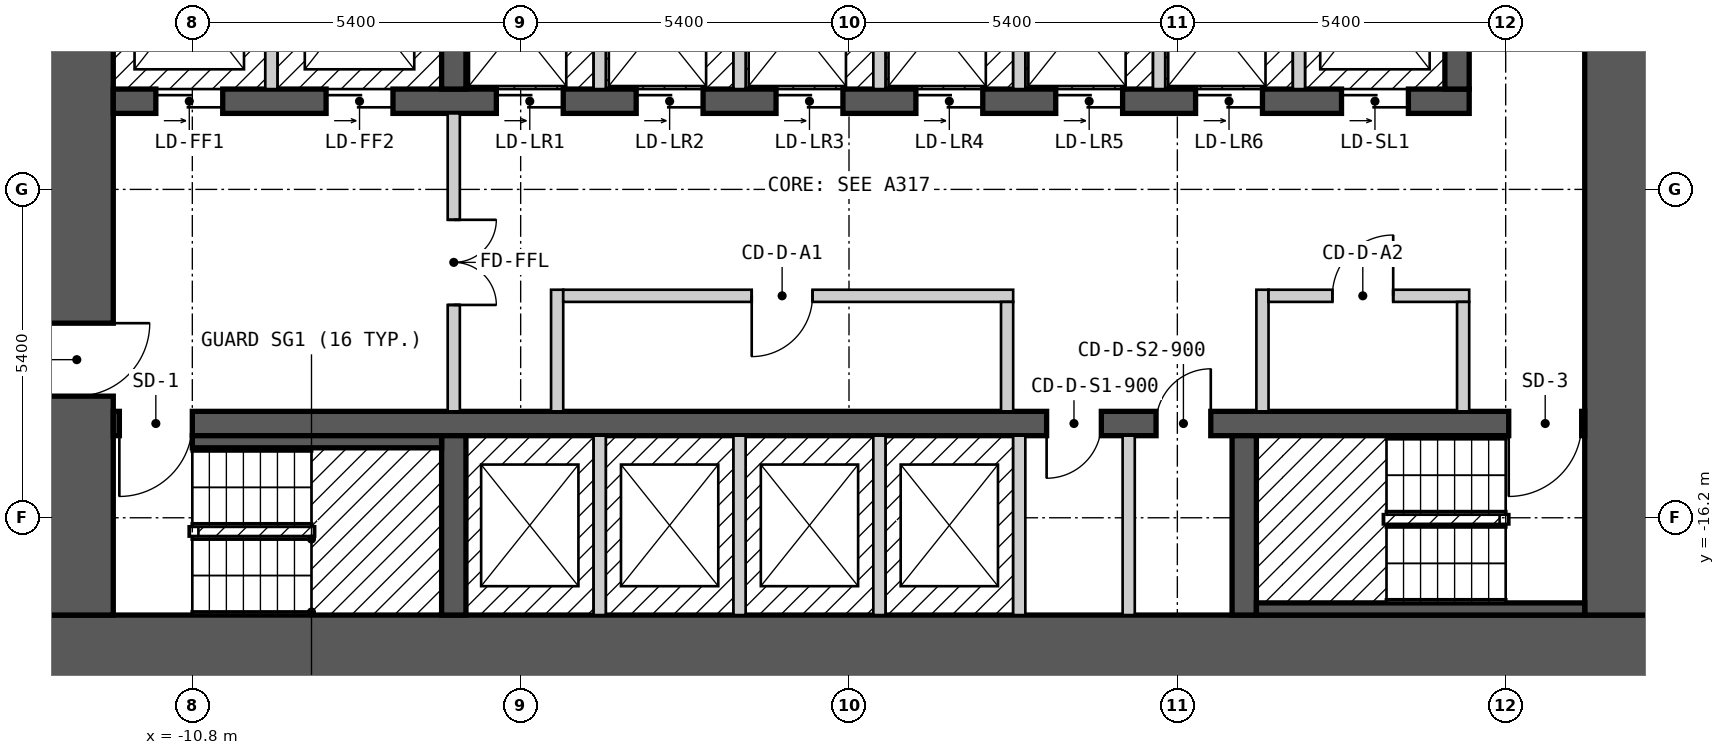
"""IFC4 building model, lengths in metres.
Left out: names, types, materials, properties, quantities, classifications, styles, units other than length and angle.
Written with IfcOpenShell. Run it as: python <this file> out.ifc"""

import sys

from ifc_helpers import new_model, si_unit, direction, frame, frame_2d, origin, place, context, subcontext, project, spatial, rectangle, extrude, element, fill, save


model = new_model("IFC4")
c1 = context("Model", 3, precision=1e-05, world=origin(), true_north=direction((0.0, 1.0)))
c2 = subcontext(c1, "Body", "Model", "MODEL_VIEW")
j1 = project(units=[si_unit("LENGTHUNIT", "METRE"), si_unit("PLANEANGLEUNIT", "RADIAN")], contexts=[c1])
p1 = place(None, origin())
s1 = spatial("IfcSite", under=j1, at=p1, CompositionType="ELEMENT")
p2 = place(p1, origin())
s2 = spatial("IfcBuilding", under=s1, at=p2, CompositionType="ELEMENT")
p3 = place(p2, frame((0.0, 0.0, 50.4)))
s3 = spatial("IfcBuildingStorey", under=s2, at=p3, CompositionType="ELEMENT", Elevation=50.4)
p4 = place(p3, frame((-13.3, -18.4, 0.0), z_axis=(0.0, 0.0, 1.0), x_axis=(1.0, 0.0, 0.0)))
e1 = element("IfcWall", 1, at=p4, inside=s3, PredefinedType="SHEAR", context=c2, shape_type="SweptSolid", body=[
    extrude(rectangle(XDim=26.6, YDim=1.2, at=frame_2d((13.3, 0.0))), origin(), (0.0, 0.0, 1.0), 2.7),
])
p5 = place(p3, frame((-12.7, -17.8, 0.0), z_axis=(0.0, 0.0, 1.0), x_axis=(0.0, 1.0, 0.0)))
e2 = element("IfcWall", 2, at=p5, inside=s3, PredefinedType="SHEAR", context=c2, shape_type="SweptSolid", body=[
    extrude(rectangle(XDim=11.6, YDim=1.2, at=frame_2d((5.8, 0.0))), origin(), (0.0, 0.0, 1.0), 2.7),
])
p6 = place(p5, frame((3.6, 0.0, 0.0)))
e3 = element("IfcOpeningElement", 3, at=p6, cuts=e2, PredefinedType="OPENING", context=c2, shape_type="SweptSolid", body=[
    extrude(rectangle(XDim=1.2, YDim=2.1, at=frame_2d((0.6, 1.05))), frame((0.0, 0.61, 0.0), z_axis=(0.0, -1.0, 0.0), x_axis=(1.0, 0.0, 0.0)), (0.0, 0.0, 1.0), 1.22),
])
p7 = place(p3, frame((12.7, -17.8, 0.0), z_axis=(0.0, 0.0, 1.0), x_axis=(0.0, 1.0, 0.0)))
e4 = element("IfcWall", 4, at=p7, inside=s3, PredefinedType="SHEAR", context=c2, shape_type="SweptSolid", body=[
    extrude(rectangle(XDim=11.6, YDim=1.2, at=frame_2d((5.8, 0.0))), origin(), (0.0, 0.0, 1.0), 2.7),
])
p8 = place(p3, frame((-12.1, -14.65, 0.0), z_axis=(0.0, 0.0, 1.0), x_axis=(1.0, 0.0, 0.0)))
e5 = element("IfcWall", 5, at=p8, inside=s3, PredefinedType="SHEAR", context=c2, shape_type="SweptSolid", body=[
    extrude(rectangle(XDim=24.2, YDim=0.4, at=frame_2d((12.1, 0.0))), origin(), (0.0, 0.0, 1.0), 2.7),
])
p9 = place(p8, frame((1.3, 0.0, 0.0), z_axis=(0.0, 0.0, 1.0), x_axis=(-1.0, 0.0, 0.0)))
e6 = element("IfcOpeningElement", 6, at=p9, cuts=e5, PredefinedType="OPENING", context=c2, shape_type="SweptSolid", body=[
    extrude(rectangle(XDim=1.2, YDim=2.1, at=frame_2d((0.6, 1.05))), frame((0.0, 0.21, 0.0), z_axis=(0.0, -1.0, 0.0), x_axis=(1.0, 0.0, 0.0)), (0.0, 0.0, 1.0), 0.42),
])
p10 = place(p8, frame((24.15, 0.0, 0.0), z_axis=(0.0, 0.0, 1.0), x_axis=(-1.0, 0.0, 0.0)))
e7 = element("IfcOpeningElement", 7, at=p10, cuts=e5, PredefinedType="OPENING", context=c2, shape_type="SweptSolid", body=[
    extrude(rectangle(XDim=1.2, YDim=2.1, at=frame_2d((0.6, 1.05))), frame((0.0, 0.21, 0.0), z_axis=(0.0, -1.0, 0.0), x_axis=(1.0, 0.0, 0.0)), (0.0, 0.0, 1.0), 0.42),
])
p11 = place(p8, frame((16.25, 0.0, 0.0), z_axis=(0.0, 0.0, 1.0), x_axis=(-1.0, 0.0, 0.0)))
e8 = element("IfcOpeningElement", 8, at=p11, cuts=e5, PredefinedType="OPENING", context=c2, shape_type="SweptSolid", body=[
    extrude(rectangle(XDim=0.9, YDim=2.1, at=frame_2d((0.45, 1.05))), frame((0.0, 0.21, 0.0), z_axis=(0.0, -1.0, 0.0), x_axis=(1.0, 0.0, 0.0)), (0.0, 0.0, 1.0), 0.42),
])
p12 = place(p8, frame((18.05, 0.0, 0.0), z_axis=(0.0, 0.0, 1.0), x_axis=(-1.0, 0.0, 0.0)))
e9 = element("IfcOpeningElement", 9, at=p12, cuts=e5, PredefinedType="OPENING", context=c2, shape_type="SweptSolid", body=[
    extrude(rectangle(XDim=0.9, YDim=2.1, at=frame_2d((0.45, 1.05))), frame((0.0, 0.21, 0.0), z_axis=(0.0, -1.0, 0.0), x_axis=(1.0, 0.0, 0.0)), (0.0, 0.0, 1.0), 0.42),
])
p13 = place(p3, frame((-12.1, -9.35, 0.0), z_axis=(0.0, 0.0, 1.0), x_axis=(1.0, 0.0, 0.0)))
e10 = element("IfcWall", 10, at=p13, inside=s3, PredefinedType="SHEAR", context=c2, shape_type="SweptSolid", body=[
    extrude(rectangle(XDim=22.3, YDim=0.4, at=frame_2d((11.15, 0.0))), origin(), (0.0, 0.0, 1.0), 2.7),
])
p14 = place(p13, frame((0.7, 0.0, 0.0)))
e11 = element("IfcOpeningElement", 11, at=p14, cuts=e10, PredefinedType="OPENING", context=c2, shape_type="SweptSolid", body=[
    extrude(rectangle(XDim=1.1, YDim=2.1, at=frame_2d((0.55, 1.05))), frame((0.0, 0.21, 0.0), z_axis=(0.0, -1.0, 0.0), x_axis=(1.0, 0.0, 0.0)), (0.0, 0.0, 1.0), 0.42),
])
p15 = place(p13, frame((3.5, 0.0, 0.0)))
e12 = element("IfcOpeningElement", 12, at=p15, cuts=e10, PredefinedType="OPENING", context=c2, shape_type="SweptSolid", body=[
    extrude(rectangle(XDim=1.1, YDim=2.1, at=frame_2d((0.55, 1.05))), frame((0.0, 0.21, 0.0), z_axis=(0.0, -1.0, 0.0), x_axis=(1.0, 0.0, 0.0)), (0.0, 0.0, 1.0), 0.42),
])
p16 = place(p13, frame((6.3, 0.0, 0.0)))
e13 = element("IfcOpeningElement", 13, at=p16, cuts=e10, PredefinedType="OPENING", context=c2, shape_type="SweptSolid", body=[
    extrude(rectangle(XDim=1.1, YDim=2.1, at=frame_2d((0.55, 1.05))), frame((0.0, 0.21, 0.0), z_axis=(0.0, -1.0, 0.0), x_axis=(1.0, 0.0, 0.0)), (0.0, 0.0, 1.0), 0.42),
])
p17 = place(p13, frame((8.6, 0.0, 0.0)))
e14 = element("IfcOpeningElement", 14, at=p17, cuts=e10, PredefinedType="OPENING", context=c2, shape_type="SweptSolid", body=[
    extrude(rectangle(XDim=1.1, YDim=2.1, at=frame_2d((0.55, 1.05))), frame((0.0, 0.21, 0.0), z_axis=(0.0, -1.0, 0.0), x_axis=(1.0, 0.0, 0.0)), (0.0, 0.0, 1.0), 0.42),
])
p18 = place(p13, frame((10.9, 0.0, 0.0)))
e15 = element("IfcOpeningElement", 15, at=p18, cuts=e10, PredefinedType="OPENING", context=c2, shape_type="SweptSolid", body=[
    extrude(rectangle(XDim=1.1, YDim=2.1, at=frame_2d((0.55, 1.05))), frame((0.0, 0.21, 0.0), z_axis=(0.0, -1.0, 0.0), x_axis=(1.0, 0.0, 0.0)), (0.0, 0.0, 1.0), 0.42),
])
p19 = place(p13, frame((13.2, 0.0, 0.0)))
e16 = element("IfcOpeningElement", 16, at=p19, cuts=e10, PredefinedType="OPENING", context=c2, shape_type="SweptSolid", body=[
    extrude(rectangle(XDim=1.1, YDim=2.1, at=frame_2d((0.55, 1.05))), frame((0.0, 0.21, 0.0), z_axis=(0.0, -1.0, 0.0), x_axis=(1.0, 0.0, 0.0)), (0.0, 0.0, 1.0), 0.42),
])
p20 = place(p13, frame((15.5, 0.0, 0.0)))
e17 = element("IfcOpeningElement", 17, at=p20, cuts=e10, PredefinedType="OPENING", context=c2, shape_type="SweptSolid", body=[
    extrude(rectangle(XDim=1.1, YDim=2.1, at=frame_2d((0.55, 1.05))), frame((0.0, 0.21, 0.0), z_axis=(0.0, -1.0, 0.0), x_axis=(1.0, 0.0, 0.0)), (0.0, 0.0, 1.0), 0.42),
])
p21 = place(p13, frame((17.8, 0.0, 0.0)))
e18 = element("IfcOpeningElement", 18, at=p21, cuts=e10, PredefinedType="OPENING", context=c2, shape_type="SweptSolid", body=[
    extrude(rectangle(XDim=1.1, YDim=2.1, at=frame_2d((0.55, 1.05))), frame((0.0, 0.21, 0.0), z_axis=(0.0, -1.0, 0.0), x_axis=(1.0, 0.0, 0.0)), (0.0, 0.0, 1.0), 0.42),
])
p22 = place(p13, frame((20.2, 0.0, 0.0)))
e19 = element("IfcOpeningElement", 19, at=p22, cuts=e10, PredefinedType="OPENING", context=c2, shape_type="SweptSolid", body=[
    extrude(rectangle(XDim=1.1, YDim=2.1, at=frame_2d((0.55, 1.05))), frame((0.0, 0.21, 0.0), z_axis=(0.0, -1.0, 0.0), x_axis=(1.0, 0.0, 0.0)), (0.0, 0.0, 1.0), 0.42),
])
for number, where, z_axis, x_axis in (
    (20, (-6.5, -17.8, 0.0), (0.0, 0.0, 1.0), (0.0, 1.0, 0.0)),
    (21, (6.5, -17.8, 0.0), (0.0, 0.0, 1.0), (0.0, 1.0, 0.0)),
    (22, (-6.5, -9.15, 0.0), (0.0, 0.0, 1.0), (0.0, 1.0, 0.0)),
    (23, (10.0, -9.15, 0.0), (0.0, 0.0, 1.0), (0.0, 1.0, 0.0)),
):
    element("IfcWall", number, at=place(p3, frame(where, z_axis=z_axis, x_axis=x_axis)), inside=s3, PredefinedType="SHEAR", context=c2, shape_type="SweptSolid", body=[
        extrude(rectangle(XDim=2.95, YDim=0.4, at=frame_2d((1.475, 0.0))), origin(), (0.0, 0.0, 1.0), 2.7),
    ])
p23 = place(p3, frame((-10.8, -14.95, 0.0), z_axis=(0.0, 0.0, 1.0), x_axis=(1.0, 0.0, 0.0)))
e24 = element("IfcWall", 24, at=p23, inside=s3, PredefinedType="SOLIDWALL", context=c2, shape_type="SweptSolid", body=[
    extrude(rectangle(XDim=4.1, YDim=0.2, at=frame_2d((2.05, 0.0))), origin(), (0.0, 0.0, 1.0), 2.7),
])
p24 = place(p3, frame((-9.5, -9.15, 0.0), z_axis=(0.0, 0.0, 1.0), x_axis=(0.0, 1.0, 0.0)))
e25 = element("IfcWall", 25, at=p24, inside=s3, PredefinedType="SOLIDWALL", context=c2, shape_type="SweptSolid", body=[
    extrude(rectangle(XDim=2.95, YDim=0.2, at=frame_2d((1.475, 0.0))), origin(), (0.0, 0.0, 1.0), 2.7),
])
p25 = place(p3, frame((-6.5, -14.45, 0.0), z_axis=(0.0, 0.0, 1.0), x_axis=(0.0, 1.0, 0.0)))
e26 = element("IfcWall", 26, at=p25, inside=s3, PredefinedType="PARTITIONING", context=c2, shape_type="SweptSolid", body=[
    extrude(rectangle(XDim=4.9, YDim=0.2, at=frame_2d((2.45, 0.0))), origin(), (0.0, 0.0, 1.0), 2.7),
])
p26 = place(p25, frame((3.15, 0.0, 0.0), z_axis=(0.0, 0.0, 1.0), x_axis=(-1.0, 0.0, 0.0)))
e27 = element("IfcOpeningElement", 27, at=p26, cuts=e26, PredefinedType="OPENING", context=c2, shape_type="SweptSolid", body=[
    extrude(rectangle(XDim=1.4, YDim=2.1, at=frame_2d((0.7, 1.05))), frame((0.0, 0.11, 0.0), z_axis=(0.0, -1.0, 0.0), x_axis=(1.0, 0.0, 0.0)), (0.0, 0.0, 1.0), 0.22),
])
p27 = place(p3, frame((-4.8, -14.45, 0.0), z_axis=(0.0, 0.0, 1.0), x_axis=(0.0, 1.0, 0.0)))
e28 = element("IfcWall", 28, at=p27, inside=s3, PredefinedType="PARTITIONING", context=c2, shape_type="SweptSolid", body=[
    extrude(rectangle(XDim=2.0, YDim=0.2, at=frame_2d((1.0, 0.0))), origin(), (0.0, 0.0, 1.0), 2.7),
])
p28 = place(p3, frame((-4.7, -12.55, 0.0), z_axis=(0.0, 0.0, 1.0), x_axis=(1.0, 0.0, 0.0)))
e29 = element("IfcWall", 29, at=p28, inside=s3, PredefinedType="PARTITIONING", context=c2, shape_type="SweptSolid", body=[
    extrude(rectangle(XDim=7.4, YDim=0.2, at=frame_2d((3.7, 0.0))), origin(), (0.0, 0.0, 1.0), 2.7),
])
p29 = place(p28, frame((4.1, 0.0, 0.0), z_axis=(0.0, 0.0, 1.0), x_axis=(-1.0, 0.0, 0.0)))
e30 = element("IfcOpeningElement", 30, at=p29, cuts=e29, PredefinedType="OPENING", context=c2, shape_type="SweptSolid", body=[
    extrude(rectangle(XDim=1.0, YDim=2.1, at=frame_2d((0.5, 1.05))), frame((0.0, 0.11, 0.0), z_axis=(0.0, -1.0, 0.0), x_axis=(1.0, 0.0, 0.0)), (0.0, 0.0, 1.0), 0.22),
])
for number, where, z_axis, x_axis in (
    (31, (-4.1, -17.8, 0.0), (0.0, 0.0, 1.0), (0.0, 1.0, 0.0)),
    (32, (-4.1, -9.15, 0.0), (0.0, 0.0, 1.0), (0.0, 1.0, 0.0)),
    (33, (-1.8, -17.8, 0.0), (0.0, 0.0, 1.0), (0.0, 1.0, 0.0)),
    (34, (-1.8, -9.15, 0.0), (0.0, 0.0, 1.0), (0.0, 1.0, 0.0)),
    (35, (0.5, -17.8, 0.0), (0.0, 0.0, 1.0), (0.0, 1.0, 0.0)),
    (36, (0.5, -9.15, 0.0), (0.0, 0.0, 1.0), (0.0, 1.0, 0.0)),
):
    element("IfcWall", number, at=place(p3, frame(where, z_axis=z_axis, x_axis=x_axis)), inside=s3, PredefinedType="SOLIDWALL", context=c2, shape_type="SweptSolid", body=[
        extrude(rectangle(XDim=2.95, YDim=0.2, at=frame_2d((1.475, 0.0))), origin(), (0.0, 0.0, 1.0), 2.7),
    ])
p30 = place(p3, frame((2.6, -14.45, 0.0), z_axis=(0.0, 0.0, 1.0), x_axis=(0.0, 1.0, 0.0)))
e37 = element("IfcWall", 37, at=p30, inside=s3, PredefinedType="PARTITIONING", context=c2, shape_type="SweptSolid", body=[
    extrude(rectangle(XDim=1.8, YDim=0.2, at=frame_2d((0.9, 0.0))), origin(), (0.0, 0.0, 1.0), 2.7),
])
for number, where, z_axis, x_axis in (
    (38, (2.8, -17.8, 0.0), (0.0, 0.0, 1.0), (0.0, 1.0, 0.0)),
    (39, (2.8, -9.15, 0.0), (0.0, 0.0, 1.0), (0.0, 1.0, 0.0)),
):
    element("IfcWall", number, at=place(p3, frame(where, z_axis=z_axis, x_axis=x_axis)), inside=s3, PredefinedType="SOLIDWALL", context=c2, shape_type="SweptSolid", body=[
        extrude(rectangle(XDim=2.95, YDim=0.2, at=frame_2d((1.475, 0.0))), origin(), (0.0, 0.0, 1.0), 2.7),
    ])
p31 = place(p3, frame((4.6, -17.8, 0.0), z_axis=(0.0, 0.0, 1.0), x_axis=(0.0, 1.0, 0.0)))
e40 = element("IfcWall", 40, at=p31, inside=s3, PredefinedType="PARTITIONING", context=c2, shape_type="SweptSolid", body=[
    extrude(rectangle(XDim=2.95, YDim=0.2, at=frame_2d((1.475, 0.0))), origin(), (0.0, 0.0, 1.0), 2.7),
])
p32 = place(p3, frame((5.1, -9.15, 0.0), z_axis=(0.0, 0.0, 1.0), x_axis=(0.0, 1.0, 0.0)))
e41 = element("IfcWall", 41, at=p32, inside=s3, PredefinedType="SOLIDWALL", context=c2, shape_type="SweptSolid", body=[
    extrude(rectangle(XDim=2.95, YDim=0.2, at=frame_2d((1.475, 0.0))), origin(), (0.0, 0.0, 1.0), 2.7),
])
p33 = place(p3, frame((6.7, -17.7, 0.0), z_axis=(0.0, 0.0, 1.0), x_axis=(1.0, 0.0, 0.0)))
e42 = element("IfcWall", 42, at=p33, inside=s3, PredefinedType="SOLIDWALL", context=c2, shape_type="SweptSolid", body=[
    extrude(rectangle(XDim=5.4, YDim=0.2, at=frame_2d((2.7, 0.0))), origin(), (0.0, 0.0, 1.0), 2.7),
])
p34 = place(p3, frame((6.8, -14.45, 0.0), z_axis=(0.0, 0.0, 1.0), x_axis=(0.0, 1.0, 0.0)))
e43 = element("IfcWall", 43, at=p34, inside=s3, PredefinedType="PARTITIONING", context=c2, shape_type="SweptSolid", body=[
    extrude(rectangle(XDim=2.0, YDim=0.2, at=frame_2d((1.0, 0.0))), origin(), (0.0, 0.0, 1.0), 2.7),
])
p35 = place(p3, frame((6.9, -12.55, 0.0), z_axis=(0.0, 0.0, 1.0), x_axis=(1.0, 0.0, 0.0)))
e44 = element("IfcWall", 44, at=p35, inside=s3, PredefinedType="PARTITIONING", context=c2, shape_type="SweptSolid", body=[
    extrude(rectangle(XDim=3.3, YDim=0.2, at=frame_2d((1.65, 0.0))), origin(), (0.0, 0.0, 1.0), 2.7),
])
p36 = place(p35, frame((2.05, 0.0, 0.0), z_axis=(0.0, 0.0, 1.0), x_axis=(-1.0, 0.0, 0.0)))
e45 = element("IfcOpeningElement", 45, at=p36, cuts=e44, PredefinedType="OPENING", context=c2, shape_type="SweptSolid", body=[
    extrude(rectangle(XDim=1.0, YDim=2.1, at=frame_2d((0.5, 1.05))), frame((0.0, 0.11, 0.0), z_axis=(0.0, -1.0, 0.0), x_axis=(1.0, 0.0, 0.0)), (0.0, 0.0, 1.0), 0.22),
])
p37 = place(p3, frame((7.4, -9.15, 0.0), z_axis=(0.0, 0.0, 1.0), x_axis=(0.0, 1.0, 0.0)))
e46 = element("IfcWall", 46, at=p37, inside=s3, PredefinedType="SOLIDWALL", context=c2, shape_type="SweptSolid", body=[
    extrude(rectangle(XDim=2.95, YDim=0.2, at=frame_2d((1.475, 0.0))), origin(), (0.0, 0.0, 1.0), 2.7),
])
p38 = place(p3, frame((10.1, -14.45, 0.0), z_axis=(0.0, 0.0, 1.0), x_axis=(0.0, 1.0, 0.0)))
e47 = element("IfcWall", 47, at=p38, inside=s3, PredefinedType="PARTITIONING", context=c2, shape_type="SweptSolid", body=[
    extrude(rectangle(XDim=1.8, YDim=0.2, at=frame_2d((0.9, 0.0))), origin(), (0.0, 0.0, 1.0), 2.7),
])
p39 = place(p14, origin())
e48 = element("IfcDoor", 48, at=p39, inside=s3, OperationType="DOUBLE_DOOR_SLIDING", PredefinedType="DOOR", context=c2, shape_type="SweptSolid", body=[
    extrude(rectangle(XDim=1.1, YDim=2.1, at=frame_2d((0.55, 1.05))), frame((0.0, 0.025, 0.0), z_axis=(0.0, -1.0, 0.0), x_axis=(1.0, 0.0, 0.0)), (0.0, 0.0, 1.0), 0.05),
])
fill(e11, e48)
p40 = place(p15, origin())
e49 = element("IfcDoor", 49, at=p40, inside=s3, OperationType="DOUBLE_DOOR_SLIDING", PredefinedType="DOOR", context=c2, shape_type="SweptSolid", body=[
    extrude(rectangle(XDim=1.1, YDim=2.1, at=frame_2d((0.55, 1.05))), frame((0.0, 0.025, 0.0), z_axis=(0.0, -1.0, 0.0), x_axis=(1.0, 0.0, 0.0)), (0.0, 0.0, 1.0), 0.05),
])
fill(e12, e49)
p41 = place(p16, origin())
e50 = element("IfcDoor", 50, at=p41, inside=s3, OperationType="DOUBLE_DOOR_SLIDING", PredefinedType="DOOR", context=c2, shape_type="SweptSolid", body=[
    extrude(rectangle(XDim=1.1, YDim=2.1, at=frame_2d((0.55, 1.05))), frame((0.0, 0.025, 0.0), z_axis=(0.0, -1.0, 0.0), x_axis=(1.0, 0.0, 0.0)), (0.0, 0.0, 1.0), 0.05),
])
fill(e13, e50)
p42 = place(p17, origin())
e51 = element("IfcDoor", 51, at=p42, inside=s3, OperationType="DOUBLE_DOOR_SLIDING", PredefinedType="DOOR", context=c2, shape_type="SweptSolid", body=[
    extrude(rectangle(XDim=1.1, YDim=2.1, at=frame_2d((0.55, 1.05))), frame((0.0, 0.025, 0.0), z_axis=(0.0, -1.0, 0.0), x_axis=(1.0, 0.0, 0.0)), (0.0, 0.0, 1.0), 0.05),
])
fill(e14, e51)
p43 = place(p18, origin())
e52 = element("IfcDoor", 52, at=p43, inside=s3, OperationType="DOUBLE_DOOR_SLIDING", PredefinedType="DOOR", context=c2, shape_type="SweptSolid", body=[
    extrude(rectangle(XDim=1.1, YDim=2.1, at=frame_2d((0.55, 1.05))), frame((0.0, 0.025, 0.0), z_axis=(0.0, -1.0, 0.0), x_axis=(1.0, 0.0, 0.0)), (0.0, 0.0, 1.0), 0.05),
])
fill(e15, e52)
p44 = place(p19, origin())
e53 = element("IfcDoor", 53, at=p44, inside=s3, OperationType="DOUBLE_DOOR_SLIDING", PredefinedType="DOOR", context=c2, shape_type="SweptSolid", body=[
    extrude(rectangle(XDim=1.1, YDim=2.1, at=frame_2d((0.55, 1.05))), frame((0.0, 0.025, 0.0), z_axis=(0.0, -1.0, 0.0), x_axis=(1.0, 0.0, 0.0)), (0.0, 0.0, 1.0), 0.05),
])
fill(e16, e53)
p45 = place(p20, origin())
e54 = element("IfcDoor", 54, at=p45, inside=s3, OperationType="DOUBLE_DOOR_SLIDING", PredefinedType="DOOR", context=c2, shape_type="SweptSolid", body=[
    extrude(rectangle(XDim=1.1, YDim=2.1, at=frame_2d((0.55, 1.05))), frame((0.0, 0.025, 0.0), z_axis=(0.0, -1.0, 0.0), x_axis=(1.0, 0.0, 0.0)), (0.0, 0.0, 1.0), 0.05),
])
fill(e17, e54)
p46 = place(p21, origin())
e55 = element("IfcDoor", 55, at=p46, inside=s3, OperationType="DOUBLE_DOOR_SLIDING", PredefinedType="DOOR", context=c2, shape_type="SweptSolid", body=[
    extrude(rectangle(XDim=1.1, YDim=2.1, at=frame_2d((0.55, 1.05))), frame((0.0, 0.025, 0.0), z_axis=(0.0, -1.0, 0.0), x_axis=(1.0, 0.0, 0.0)), (0.0, 0.0, 1.0), 0.05),
])
fill(e18, e55)
p47 = place(p22, origin())
e56 = element("IfcDoor", 56, at=p47, inside=s3, OperationType="DOUBLE_DOOR_SLIDING", PredefinedType="DOOR", context=c2, shape_type="SweptSolid", body=[
    extrude(rectangle(XDim=1.1, YDim=2.1, at=frame_2d((0.55, 1.05))), frame((0.0, 0.025, 0.0), z_axis=(0.0, -1.0, 0.0), x_axis=(1.0, 0.0, 0.0)), (0.0, 0.0, 1.0), 0.05),
])
fill(e19, e56)
p48 = place(p9, origin())
e57 = element("IfcDoor", 57, at=p48, inside=s3, OperationType="SINGLE_SWING_RIGHT", PredefinedType="DOOR", context=c2, shape_type="SweptSolid", body=[
    extrude(rectangle(XDim=1.2, YDim=2.1, at=frame_2d((0.6, 1.05))), frame((0.0, 0.025, 0.0), z_axis=(0.0, -1.0, 0.0), x_axis=(1.0, 0.0, 0.0)), (0.0, 0.0, 1.0), 0.05),
])
fill(e6, e57)
p49 = place(p10, origin())
e58 = element("IfcDoor", 58, at=p49, inside=s3, OperationType="SINGLE_SWING_RIGHT", PredefinedType="DOOR", context=c2, shape_type="SweptSolid", body=[
    extrude(rectangle(XDim=1.2, YDim=2.1, at=frame_2d((0.6, 1.05))), frame((0.0, 0.025, 0.0), z_axis=(0.0, -1.0, 0.0), x_axis=(1.0, 0.0, 0.0)), (0.0, 0.0, 1.0), 0.05),
])
fill(e7, e58)
p50 = place(p6, origin())
e59 = element("IfcDoor", 59, at=p50, inside=s3, OperationType="SINGLE_SWING_RIGHT", PredefinedType="DOOR", context=c2, shape_type="SweptSolid", body=[
    extrude(rectangle(XDim=1.2, YDim=2.1, at=frame_2d((0.6, 1.05))), frame((0.0, 0.025, 0.0), z_axis=(0.0, -1.0, 0.0), x_axis=(1.0, 0.0, 0.0)), (0.0, 0.0, 1.0), 0.05),
])
fill(e3, e59)
p51 = place(p26, origin())
e60 = element("IfcDoor", 60, at=p51, inside=s3, OperationType="DOUBLE_DOOR_SINGLE_SWING", PredefinedType="DOOR", context=c2, shape_type="SweptSolid", body=[
    extrude(rectangle(XDim=1.4, YDim=2.1, at=frame_2d((0.7, 1.05))), frame((0.0, 0.025, 0.0), z_axis=(0.0, -1.0, 0.0), x_axis=(1.0, 0.0, 0.0)), (0.0, 0.0, 1.0), 0.05),
])
fill(e27, e60)
p52 = place(p29, origin())
e61 = element("IfcDoor", 61, at=p52, inside=s3, OperationType="SINGLE_SWING_RIGHT", PredefinedType="DOOR", context=c2, shape_type="SweptSolid", body=[
    extrude(rectangle(XDim=1.0, YDim=2.1, at=frame_2d((0.5, 1.05))), frame((0.0, 0.025, 0.0), z_axis=(0.0, -1.0, 0.0), x_axis=(1.0, 0.0, 0.0)), (0.0, 0.0, 1.0), 0.05),
])
fill(e30, e61)
p53 = place(p36, origin())
e62 = element("IfcDoor", 62, at=p53, inside=s3, OperationType="SINGLE_SWING_LEFT", PredefinedType="DOOR", context=c2, shape_type="SweptSolid", body=[
    extrude(rectangle(XDim=1.0, YDim=2.1, at=frame_2d((0.5, 1.05))), frame((0.0, 0.025, 0.0), z_axis=(0.0, -1.0, 0.0), x_axis=(1.0, 0.0, 0.0)), (0.0, 0.0, 1.0), 0.05),
])
fill(e45, e62)
p54 = place(p11, origin())
e63 = element("IfcDoor", 63, at=p54, inside=s3, OperationType="SINGLE_SWING_RIGHT", PredefinedType="DOOR", context=c2, shape_type="SweptSolid", body=[
    extrude(rectangle(XDim=0.9, YDim=2.1, at=frame_2d((0.45, 1.05))), frame((0.0, 0.025, 0.0), z_axis=(0.0, -1.0, 0.0), x_axis=(1.0, 0.0, 0.0)), (0.0, 0.0, 1.0), 0.05),
])
fill(e8, e63)
p55 = place(p12, origin())
e64 = element("IfcDoor", 64, at=p55, inside=s3, OperationType="SINGLE_SWING_LEFT", PredefinedType="DOOR", context=c2, shape_type="SweptSolid", body=[
    extrude(rectangle(XDim=0.9, YDim=2.1, at=frame_2d((0.45, 1.05))), frame((0.0, 0.025, 0.0), z_axis=(0.0, -1.0, 0.0), x_axis=(1.0, 0.0, 0.0)), (0.0, 0.0, 1.0), 0.05),
])
fill(e9, e64)
save(model, sys.argv[1])
